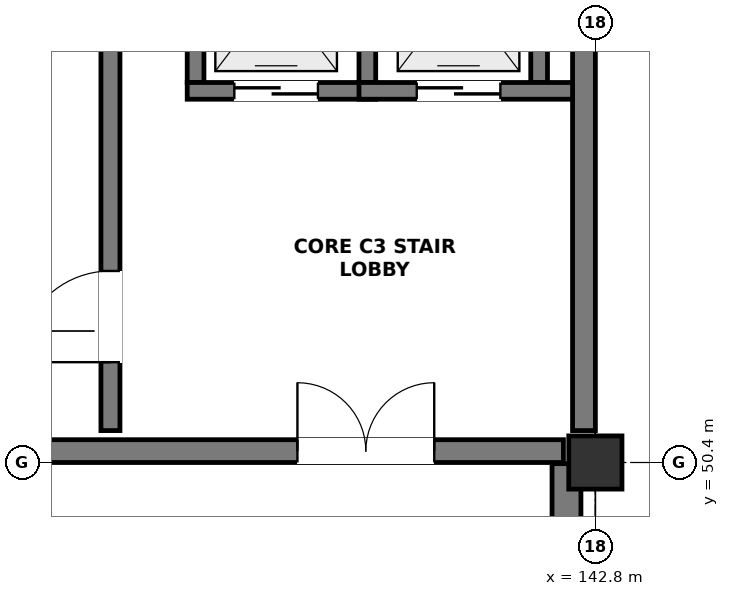
"""IFC4 building model, lengths in metres.
Left out: names, types, materials, properties, quantities, classifications, styles, units other than length and angle.
Written with IfcOpenShell. Run it as: python <this file> out.ifc"""

import sys

from ifc_helpers import new_model, si_unit, direction, frame, frame_2d, origin, origin_2d, place, context, subcontext, project, spatial, rectangle, extrude, element, fill, save


model = new_model("IFC4")
c1 = context("Model", 3, precision=1e-05, world=origin(), true_north=direction((0.0, 1.0)))
c2 = subcontext(c1, "Body", "Model", "MODEL_VIEW")
j1 = project(units=[si_unit("LENGTHUNIT", "METRE"), si_unit("PLANEANGLEUNIT", "RADIAN")], contexts=[c1])
p1 = place(None, origin())
s1 = spatial("IfcSite", under=j1, at=p1, CompositionType="ELEMENT")
p2 = place(p1, origin())
s2 = spatial("IfcBuilding", under=s1, at=p2, CompositionType="ELEMENT")
p3 = place(p2, frame((0.0, 0.0, -4.8)))
s3 = spatial("IfcBuildingStorey", under=s2, at=p3, CompositionType="ELEMENT", Elevation=-4.8)
p4 = place(p3, frame((142.8, 50.4, 0.0), z_axis=(0.0, 0.0, 1.0), x_axis=(1.0, 0.0, 0.0)))
e1 = element("IfcColumn", 1, at=p4, inside=s3, PredefinedType="COLUMN", context=c2, shape_type="SweptSolid", body=[
    extrude(rectangle(XDim=0.7, YDim=0.7, at=origin_2d()), origin(), (0.0, 0.0, 1.0), 4.8),
])
p5 = place(p3, frame((142.42, 50.385, 0.0), z_axis=(0.0, 0.0, 1.0), x_axis=(0.0, -1.0, 0.0)))
e2 = element("IfcWall", 2, at=p5, inside=s3, PredefinedType="USERDEFINED", context=c2, shape_type="SweptSolid", body=[
    extrude(rectangle(XDim=8.146, YDim=0.38, at=frame_2d((4.073, 0.0))), origin(), (0.0, 0.0, 1.0), 3.75),
])
p6 = place(p3, frame((126.45, 50.55, 0.0), z_axis=(0.0, 0.0, 1.0), x_axis=(1.0, 0.0, 0.0)))
e3 = element("IfcWall", 3, at=p6, inside=s3, PredefinedType="SHEAR", context=c2, shape_type="SweptSolid", body=[
    extrude(rectangle(XDim=15.93, YDim=0.3, at=frame_2d((7.965, 0.0))), origin(), (0.0, 0.0, 1.0), 4.5),
])
p7 = place(p6, frame((12.43, 0.0, 0.0)))
e4 = element("IfcOpeningElement", 4, at=p7, cuts=e3, PredefinedType="OPENING", context=c2, shape_type="SweptSolid", body=[
    extrude(rectangle(XDim=1.8, YDim=2.2, at=frame_2d((0.9, 1.1))), frame((0.0, 0.162, 0.0), z_axis=(0.0, -1.0, 0.0), x_axis=(1.0, 0.0, 0.0)), (0.0, 0.0, 1.0), 0.324),
])
p8 = place(p3, frame((142.65, 50.82, 0.0), z_axis=(0.0, 0.0, 1.0), x_axis=(0.0, 1.0, 0.0)))
e5 = element("IfcWall", 5, at=p8, inside=s3, PredefinedType="SHEAR", context=c2, shape_type="SweptSolid", body=[
    extrude(rectangle(XDim=7.56, YDim=0.3, at=frame_2d((3.78, 0.0))), origin(), (0.0, 0.0, 1.0), 4.5),
])
p9 = place(p3, frame((136.42, 50.82, 0.0), z_axis=(0.0, 0.0, 1.0), x_axis=(0.0, 1.0, 0.0)))
e6 = element("IfcWall", 6, at=p9, inside=s3, PredefinedType="SHEAR", context=c2, shape_type="SweptSolid", body=[
    extrude(rectangle(XDim=7.56, YDim=0.25, at=frame_2d((3.78, 0.0))), origin(), (0.0, 0.0, 1.0), 4.5),
])
p10 = place(p9, frame((0.9, 0.0, 0.0)))
e7 = element("IfcOpeningElement", 7, at=p10, cuts=e6, PredefinedType="OPENING", context=c2, shape_type="SweptSolid", body=[
    extrude(rectangle(XDim=1.2, YDim=2.2, at=frame_2d((0.6, 1.1))), frame((0.0, 0.137, 0.0), z_axis=(0.0, -1.0, 0.0), x_axis=(1.0, 0.0, 0.0)), (0.0, 0.0, 1.0), 0.274),
])
p11 = place(p3, frame((137.54, 55.4, 0.0), z_axis=(0.0, 0.0, 1.0), x_axis=(0.0, 1.0, 0.0)))
e8 = element("IfcWall", 8, at=p11, inside=s3, PredefinedType="SOLIDWALL", context=c2, shape_type="SweptSolid", body=[
    extrude(rectangle(XDim=2.4, YDim=0.22, at=frame_2d((1.2, 0.0))), origin(), (0.0, 0.0, 1.0), 4.5),
])
p12 = place(p3, frame((137.43, 55.29, 0.0), z_axis=(0.0, 0.0, 1.0), x_axis=(1.0, 0.0, 0.0)))
e9 = element("IfcWall", 9, at=p12, inside=s3, PredefinedType="SOLIDWALL", context=c2, shape_type="SweptSolid", body=[
    extrude(rectangle(XDim=2.48, YDim=0.22, at=frame_2d((1.24, 0.0))), origin(), (0.0, 0.0, 1.0), 4.5),
])
p13 = place(p12, frame((0.62, 0.0, 0.0)))
e10 = element("IfcOpeningElement", 10, at=p13, cuts=e9, PredefinedType="OPENING", context=c2, shape_type="SweptSolid", body=[
    extrude(rectangle(XDim=1.1, YDim=2.15, at=frame_2d((0.55, 1.075))), frame((0.0, 0.122, 0.0), z_axis=(0.0, -1.0, 0.0), x_axis=(1.0, 0.0, 0.0)), (0.0, 0.0, 1.0), 0.244),
])
for number, where, z_axis, x_axis in (
    (11, (139.8, 55.4, 0.0), (0.0, 0.0, 1.0), (0.0, 1.0, 0.0)),
    (12, (142.06, 55.4, 0.0), (0.0, 0.0, 1.0), (0.0, 1.0, 0.0)),
):
    element("IfcWall", number, at=place(p3, frame(where, z_axis=z_axis, x_axis=x_axis)), inside=s3, PredefinedType="SOLIDWALL", context=c2, shape_type="SweptSolid", body=[
        extrude(rectangle(XDim=2.4, YDim=0.22, at=frame_2d((1.2, 0.0))), origin(), (0.0, 0.0, 1.0), 4.5),
    ])
p14 = place(p3, frame((139.69, 55.29, 0.0), z_axis=(0.0, 0.0, 1.0), x_axis=(1.0, 0.0, 0.0)))
e13 = element("IfcWall", 13, at=p14, inside=s3, PredefinedType="SOLIDWALL", context=c2, shape_type="SweptSolid", body=[
    extrude(rectangle(XDim=2.81, YDim=0.22, at=frame_2d((1.405, 0.0))), origin(), (0.0, 0.0, 1.0), 4.5),
])
p15 = place(p14, frame((0.76, 0.0, 0.0)))
e14 = element("IfcOpeningElement", 14, at=p15, cuts=e13, PredefinedType="OPENING", context=c2, shape_type="SweptSolid", body=[
    extrude(rectangle(XDim=1.1, YDim=2.15, at=frame_2d((0.55, 1.075))), frame((0.0, 0.122, 0.0), z_axis=(0.0, -1.0, 0.0), x_axis=(1.0, 0.0, 0.0)), (0.0, 0.0, 1.0), 0.244),
])
p16 = place(p7, origin())
e15 = element("IfcDoor", 15, at=p16, inside=s3, OperationType="DOUBLE_DOOR_SINGLE_SWING", PredefinedType="DOOR", context=c2, shape_type="SweptSolid", body=[
    extrude(rectangle(XDim=1.8, YDim=2.2, at=frame_2d((0.9, 1.1))), frame((0.0, 0.025, 0.0), z_axis=(0.0, -1.0, 0.0), x_axis=(1.0, 0.0, 0.0)), (0.0, 0.0, 1.0), 0.05),
])
fill(e4, e15)
p17 = place(p10, origin())
e16 = element("IfcDoor", 16, at=p17, inside=s3, OperationType="SINGLE_SWING_LEFT", PredefinedType="DOOR", context=c2, shape_type="SweptSolid", body=[
    extrude(rectangle(XDim=1.2, YDim=2.2, at=frame_2d((0.6, 1.1))), frame((0.0, 0.025, 0.0), z_axis=(0.0, -1.0, 0.0), x_axis=(1.0, 0.0, 0.0)), (0.0, 0.0, 1.0), 0.05),
])
fill(e7, e16)
p18 = place(p13, origin())
e17 = element("IfcDoor", 17, at=p18, inside=s3, OperationType="DOUBLE_DOOR_SLIDING", PredefinedType="DOOR", context=c2, shape_type="SweptSolid", body=[
    extrude(rectangle(XDim=1.1, YDim=2.15, at=frame_2d((0.55, 1.075))), frame((0.0, 0.025, 0.0), z_axis=(0.0, -1.0, 0.0), x_axis=(1.0, 0.0, 0.0)), (0.0, 0.0, 1.0), 0.05),
])
fill(e10, e17)
p19 = place(p15, origin())
e18 = element("IfcDoor", 18, at=p19, inside=s3, OperationType="DOUBLE_DOOR_SLIDING", PredefinedType="DOOR", context=c2, shape_type="SweptSolid", body=[
    extrude(rectangle(XDim=1.1, YDim=2.15, at=frame_2d((0.55, 1.075))), frame((0.0, 0.025, 0.0), z_axis=(0.0, -1.0, 0.0), x_axis=(1.0, 0.0, 0.0)), (0.0, 0.0, 1.0), 0.05),
])
fill(e14, e18)
save(model, sys.argv[1])
